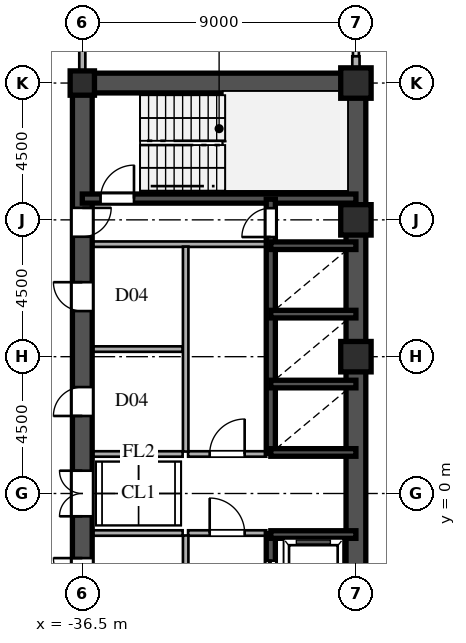
"""IFC4 building model, lengths in metres.
Left out: names, types, materials, properties, quantities, classifications, styles, units other than length and angle.
Written with IfcOpenShell. Run it as: python <this file> out.ifc"""

import sys

from ifc_helpers import new_model, si_unit, direction, frame, frame_2d, origin, origin_2d, place, context, subcontext, project, spatial, rectangle, hollow_rectangle, i_section, extrude, source, transform, mapped, element, fill, save


model = new_model("IFC4")
c1 = context("Model", 3, precision=1e-05, world=origin(), true_north=direction((0.0, 1.0)))
c2 = subcontext(c1, "Body", "Model", "MODEL_VIEW")
j1 = project(units=[si_unit("LENGTHUNIT", "METRE"), si_unit("PLANEANGLEUNIT", "RADIAN")], contexts=[c1])
p1 = place(None, origin())
s1 = spatial("IfcSite", under=j1, at=p1, CompositionType="ELEMENT")
p2 = place(p1, origin())
s2 = spatial("IfcBuilding", under=s1, at=p2, CompositionType="ELEMENT")
p3 = place(p2, frame((0.0, 0.0, 72.9)))
s3 = spatial("IfcBuildingStorey", under=s2, at=p3, CompositionType="ELEMENT", Elevation=72.9)
m1 = source(origin(), c2, "Body", "SweptSolid", [
    extrude(hollow_rectangle(XDim=1.0, YDim=1.0, WallThickness=0.042, at=origin_2d()), origin(), (0.0, 0.0, 1.0), 3.6),
])
for number, where, z_axis, x_axis in (
    (1, (-27.5, 4.5, 0.0), (0.0, 0.0, 1.0), (1.0, 0.0, 0.0)),
    (2, (-27.5, 9.0, 0.0), (0.0, 0.0, 1.0), (1.0, 0.0, 0.0)),
    (3, (-27.5, 13.5, 0.0), (0.0, 0.0, 1.0), (1.0, 0.0, 0.0)),
):
    element("IfcColumn", number, at=place(p3, frame(where, z_axis=z_axis, x_axis=x_axis)), inside=s3, PredefinedType="COLUMN", context=c2, shape_type="MappedRepresentation", body=[
        mapped(m1, transform((0.0, 0.0, 0.0), scale=1.0)),
    ])
m2 = source(origin(), c2, "Body", "SweptSolid", [
    extrude(i_section(OverallWidth=0.8, OverallDepth=0.8, WebThickness=0.032, FlangeThickness=0.05, at=origin_2d()), origin(), (0.0, 0.0, 1.0), 3.6),
])
p4 = place(p3, frame((-36.5, 13.5, 0.0), z_axis=(0.0, 0.0, 1.0), x_axis=(1.0, 0.0, 0.0)))
e4 = element("IfcColumn", 4, at=p4, inside=s3, PredefinedType="COLUMN", context=c2, shape_type="MappedRepresentation", body=[
    mapped(m2, transform((0.0, 0.0, 0.0), scale=1.0)),
])
p5 = place(p3, frame((-27.5, 13.83, 0.0), z_axis=(0.0, 0.0, 1.0), x_axis=(0.0, 1.0, 0.0)))
e5 = element("IfcWall", 5, at=p5, inside=s3, PredefinedType="SOLIDWALL", context=c2, shape_type="SweptSolid", body=[
    extrude(rectangle(XDim=0.55, YDim=0.24, at=frame_2d((0.275, 0.0))), origin(), (0.0, 0.0, 1.0), 2.88),
])
for number, where, z_axis, x_axis in (
    (6, (-27.5, -13.5, 0.0), (0.0, 0.0, 1.0), (0.0, 1.0, 0.0)),
    (7, (-27.5, 1.3, 0.0), (0.0, 0.0, 1.0), (0.0, 1.0, 0.0)),
):
    element("IfcWall", number, at=place(p3, frame(where, z_axis=z_axis, x_axis=x_axis)), inside=s3, PredefinedType="SHEAR", context=c2, shape_type="SweptSolid", body=[
        extrude(rectangle(XDim=12.2, YDim=0.65, at=frame_2d((6.1, 0.0))), origin(), (0.0, 0.0, 1.0), 3.38),
    ])
p6 = place(p3, frame((-27.5, -1.3, 0.0), z_axis=(0.0, 0.0, 1.0), x_axis=(0.0, 1.0, 0.0)))
e8 = element("IfcWall", 8, at=p6, inside=s3, PredefinedType="SHEAR", context=c2, shape_type="SweptSolid", body=[
    extrude(rectangle(XDim=2.6, YDim=0.65, at=frame_2d((1.3, 0.0))), origin(), (0.0, 0.0, 1.0), 3.38),
])
p7 = place(p3, frame((-36.5, 13.5, 0.0), z_axis=(0.0, 0.0, 1.0), x_axis=(1.0, 0.0, 0.0)))
e9 = element("IfcWall", 9, at=p7, inside=s3, PredefinedType="SHEAR", context=c2, shape_type="SweptSolid", body=[
    extrude(rectangle(XDim=9.0, YDim=0.65, at=frame_2d((4.5, 0.0))), origin(), (0.0, 0.0, 1.0), 3.38),
])
p8 = place(p3, frame((-36.5, -1.3, 0.0), z_axis=(0.0, 0.0, 1.0), x_axis=(0.0, 1.0, 0.0)))
e10 = element("IfcWall", 10, at=p8, inside=s3, PredefinedType="SHEAR", context=c2, shape_type="SweptSolid", body=[
    extrude(rectangle(XDim=2.6, YDim=0.65, at=frame_2d((1.3, 0.0))), origin(), (0.0, 0.0, 1.0), 3.38),
])
p9 = place(p8, frame((0.55, 0.0, 0.0)))
e11 = element("IfcOpeningElement", 11, at=p9, cuts=e10, PredefinedType="OPENING", context=c2, shape_type="SweptSolid", body=[
    extrude(rectangle(XDim=1.5, YDim=2.3, at=frame_2d((0.75, 1.15))), frame((0.0, 0.335, 0.0), z_axis=(0.0, -1.0, 0.0), x_axis=(1.0, 0.0, 0.0)), (0.0, 0.0, 1.0), 0.67),
])
p10 = place(p3, frame((-36.5, 8.2, 0.0), z_axis=(0.0, 0.0, 1.0), x_axis=(0.0, 1.0, 0.0)))
e12 = element("IfcWall", 12, at=p10, inside=s3, PredefinedType="SHEAR", context=c2, shape_type="SweptSolid", body=[
    extrude(rectangle(XDim=5.45, YDim=0.65, at=frame_2d((2.725, 0.0))), origin(), (0.0, 0.0, 1.0), 3.38),
])
p11 = place(p10, frame((0.245, 0.0, 0.0)))
e13 = element("IfcOpeningElement", 13, at=p11, cuts=e12, PredefinedType="OPENING", context=c2, shape_type="SweptSolid", body=[
    extrude(rectangle(XDim=0.95, YDim=2.15, at=frame_2d((0.475, 1.075))), frame((0.0, 0.335, 0.0), z_axis=(0.0, -1.0, 0.0), x_axis=(1.0, 0.0, 0.0)), (0.0, 0.0, 1.0), 0.67),
])
p12 = place(p3, frame((-36.5, -3.9, 0.0), z_axis=(0.0, 0.0, 1.0), x_axis=(0.0, 1.0, 0.0)))
e14 = element("IfcWall", 14, at=p12, inside=s3, PredefinedType="SHEAR", context=c2, shape_type="SweptSolid", body=[
    extrude(rectangle(XDim=2.6, YDim=0.65, at=frame_2d((1.3, 0.0))), origin(), (0.0, 0.0, 1.0), 3.38),
])
p13 = place(p12, frame((0.825, 0.0, 0.0)))
e15 = element("IfcOpeningElement", 15, at=p13, cuts=e14, PredefinedType="OPENING", context=c2, shape_type="SweptSolid", body=[
    extrude(rectangle(XDim=0.95, YDim=2.15, at=frame_2d((0.475, 1.075))), frame((0.0, 0.335, 0.0), z_axis=(0.0, -1.0, 0.0), x_axis=(1.0, 0.0, 0.0)), (0.0, 0.0, 1.0), 0.67),
])
p14 = place(p3, frame((-36.5, 1.3, 0.0), z_axis=(0.0, 0.0, 1.0), x_axis=(0.0, 1.0, 0.0)))
e16 = element("IfcWall", 16, at=p14, inside=s3, PredefinedType="SHEAR", context=c2, shape_type="SweptSolid", body=[
    extrude(rectangle(XDim=3.45, YDim=0.65, at=frame_2d((1.725, 0.0))), origin(), (0.0, 0.0, 1.0), 3.38),
])
p15 = place(p14, frame((1.25, 0.0, 0.0)))
e17 = element("IfcOpeningElement", 17, at=p15, cuts=e16, PredefinedType="OPENING", context=c2, shape_type="SweptSolid", body=[
    extrude(rectangle(XDim=0.95, YDim=2.15, at=frame_2d((0.475, 1.075))), frame((0.0, 0.335, 0.0), z_axis=(0.0, -1.0, 0.0), x_axis=(1.0, 0.0, 0.0)), (0.0, 0.0, 1.0), 0.67),
])
p16 = place(p3, frame((-36.5, 4.75, 0.0), z_axis=(0.0, 0.0, 1.0), x_axis=(0.0, 1.0, 0.0)))
e18 = element("IfcWall", 18, at=p16, inside=s3, PredefinedType="SHEAR", context=c2, shape_type="SweptSolid", body=[
    extrude(rectangle(XDim=3.45, YDim=0.65, at=frame_2d((1.725, 0.0))), origin(), (0.0, 0.0, 1.0), 3.38),
])
p17 = place(p16, frame((1.25, 0.0, 0.0)))
e19 = element("IfcOpeningElement", 19, at=p17, cuts=e18, PredefinedType="OPENING", context=c2, shape_type="SweptSolid", body=[
    extrude(rectangle(XDim=0.95, YDim=2.15, at=frame_2d((0.475, 1.075))), frame((0.0, 0.335, 0.0), z_axis=(0.0, -1.0, 0.0), x_axis=(1.0, 0.0, 0.0)), (0.0, 0.0, 1.0), 0.67),
])
p18 = place(p3, frame((-36.5, 9.7, 0.0), z_axis=(0.0, 0.0, 1.0), x_axis=(1.0, 0.0, 0.0)))
e20 = element("IfcWall", 20, at=p18, inside=s3, PredefinedType="SHEAR", context=c2, shape_type="SweptSolid", body=[
    extrude(rectangle(XDim=9.0, YDim=0.3, at=frame_2d((4.5, 0.0))), origin(), (0.0, 0.0, 1.0), 3.38),
])
p19 = place(p18, frame((0.6, 0.0, 0.0)))
e21 = element("IfcOpeningElement", 21, at=p19, cuts=e20, PredefinedType="OPENING", context=c2, shape_type="SweptSolid", body=[
    extrude(rectangle(XDim=1.1, YDim=2.2, at=frame_2d((0.55, 1.1))), frame((0.0, 0.16, 0.0), z_axis=(0.0, -1.0, 0.0), x_axis=(1.0, 0.0, 0.0)), (0.0, 0.0, 1.0), 0.32),
])
for number, where, z_axis, x_axis in (
    (22, (-30.3, -1.35, 0.0), (0.0, 0.0, 1.0), (1.0, 0.0, 0.0)),
    (23, (-30.3, 1.35, 0.0), (0.0, 0.0, 1.0), (1.0, 0.0, 0.0)),
    (24, (-30.3, 3.6, 0.0), (0.0, 0.0, 1.0), (1.0, 0.0, 0.0)),
    (25, (-30.3, 5.9, 0.0), (0.0, 0.0, 1.0), (1.0, 0.0, 0.0)),
    (26, (-30.3, 8.15, 0.0), (0.0, 0.0, 1.0), (1.0, 0.0, 0.0)),
):
    element("IfcWall", number, at=place(p3, frame(where, z_axis=z_axis, x_axis=x_axis)), inside=s3, PredefinedType="SHEAR", context=c2, shape_type="SweptSolid", body=[
        extrude(rectangle(XDim=2.8, YDim=0.25, at=frame_2d((1.4, 0.0))), origin(), (0.0, 0.0, 1.0), 3.38),
    ])
p20 = place(p3, frame((-30.3, -4.2, 0.0), z_axis=(0.0, 0.0, 1.0), x_axis=(0.0, 1.0, 0.0)))
e27 = element("IfcWall", 27, at=p20, inside=s3, PredefinedType="SHEAR", context=c2, shape_type="SweptSolid", body=[
    extrude(rectangle(XDim=2.88, YDim=0.3, at=frame_2d((1.44, 0.0))), origin(), (0.0, 0.0, 1.0), 3.38),
])
p21 = place(p20, frame((0.89, 0.0, 0.0)))
e28 = element("IfcOpeningElement", 28, at=p21, cuts=e27, PredefinedType="OPENING", context=c2, shape_type="SweptSolid", body=[
    extrude(rectangle(XDim=1.1, YDim=2.2, at=frame_2d((0.55, 1.1))), frame((0.0, 0.16, 0.0), z_axis=(0.0, -1.0, 0.0), x_axis=(1.0, 0.0, 0.0)), (0.0, 0.0, 1.0), 0.32),
])
p22 = place(p3, frame((-30.3, 1.32, 0.0), z_axis=(0.0, 0.0, 1.0), x_axis=(0.0, 1.0, 0.0)))
e29 = element("IfcWall", 29, at=p22, inside=s3, PredefinedType="SHEAR", context=c2, shape_type="SweptSolid", body=[
    extrude(rectangle(XDim=2.28, YDim=0.3, at=frame_2d((1.14, 0.0))), origin(), (0.0, 0.0, 1.0), 3.38),
])
p23 = place(p3, frame((-30.3, 3.6, 0.0), z_axis=(0.0, 0.0, 1.0), x_axis=(0.0, 1.0, 0.0)))
e30 = element("IfcWall", 30, at=p23, inside=s3, PredefinedType="SHEAR", context=c2, shape_type="SweptSolid", body=[
    extrude(rectangle(XDim=2.3, YDim=0.3, at=frame_2d((1.15, 0.0))), origin(), (0.0, 0.0, 1.0), 3.38),
])
p24 = place(p3, frame((-30.3, 5.9, 0.0), z_axis=(0.0, 0.0, 1.0), x_axis=(0.0, 1.0, 0.0)))
e31 = element("IfcWall", 31, at=p24, inside=s3, PredefinedType="SHEAR", context=c2, shape_type="SweptSolid", body=[
    extrude(rectangle(XDim=2.25, YDim=0.3, at=frame_2d((1.125, 0.0))), origin(), (0.0, 0.0, 1.0), 3.38),
])
p25 = place(p3, frame((-30.3, 8.15, 0.0), z_axis=(0.0, 0.0, 1.0), x_axis=(0.0, 1.0, 0.0)))
e32 = element("IfcWall", 32, at=p25, inside=s3, PredefinedType="SHEAR", context=c2, shape_type="SweptSolid", body=[
    extrude(rectangle(XDim=1.53, YDim=0.3, at=frame_2d((0.765, 0.0))), origin(), (0.0, 0.0, 1.0), 3.38),
])
p26 = place(p25, frame((0.285, 0.0, 0.0)))
e33 = element("IfcOpeningElement", 33, at=p26, cuts=e32, PredefinedType="OPENING", context=c2, shape_type="SweptSolid", body=[
    extrude(rectangle(XDim=0.95, YDim=2.15, at=frame_2d((0.475, 1.075))), frame((0.0, 0.16, 0.0), z_axis=(0.0, -1.0, 0.0), x_axis=(1.0, 0.0, 0.0)), (0.0, 0.0, 1.0), 0.32),
])
p27 = place(p3, frame((-36.15, 8.2, 0.0), z_axis=(0.0, 0.0, 1.0), x_axis=(1.0, 0.0, 0.0)))
e34 = element("IfcWall", 34, at=p27, inside=s3, PredefinedType="PARTITIONING", context=c2, shape_type="SweptSolid", body=[
    extrude(rectangle(XDim=5.7, YDim=0.18, at=frame_2d((2.85, 0.0))), origin(), (0.0, 0.0, 1.0), 3.38),
])
p28 = place(p3, frame((-33.1, -6.42, 0.0), z_axis=(0.0, 0.0, 1.0), x_axis=(0.0, 1.0, 0.0)))
e35 = element("IfcWall", 35, at=p28, inside=s3, PredefinedType="PARTITIONING", context=c2, shape_type="SweptSolid", body=[
    extrude(rectangle(XDim=5.04, YDim=0.18, at=frame_2d((2.52, 0.0))), origin(), (0.0, 0.0, 1.0), 3.38),
])
p29 = place(p3, frame((-33.1, 1.38, 0.0), z_axis=(0.0, 0.0, 1.0), x_axis=(0.0, 1.0, 0.0)))
e36 = element("IfcWall", 36, at=p29, inside=s3, PredefinedType="PARTITIONING", context=c2, shape_type="SweptSolid", body=[
    extrude(rectangle(XDim=6.74, YDim=0.18, at=frame_2d((3.37, 0.0))), origin(), (0.0, 0.0, 1.0), 3.38),
])
p30 = place(p3, frame((-33.02, -1.3, 0.0), z_axis=(0.0, 0.0, 1.0), x_axis=(1.0, 0.0, 0.0)))
e37 = element("IfcWall", 37, at=p30, inside=s3, PredefinedType="PARTITIONING", context=c2, shape_type="SweptSolid", body=[
    extrude(rectangle(XDim=2.57, YDim=0.18, at=frame_2d((1.285, 0.0))), origin(), (0.0, 0.0, 1.0), 3.38),
])
p31 = place(p30, frame((0.71, 0.0, 0.0)))
e38 = element("IfcOpeningElement", 38, at=p31, cuts=e37, PredefinedType="OPENING", context=c2, shape_type="SweptSolid", body=[
    extrude(rectangle(XDim=1.15, YDim=2.2, at=frame_2d((0.575, 1.1))), frame((0.0, 0.1, 0.0), z_axis=(0.0, -1.0, 0.0), x_axis=(1.0, 0.0, 0.0)), (0.0, 0.0, 1.0), 0.2),
])
p32 = place(p3, frame((-33.02, 1.3, 0.0), z_axis=(0.0, 0.0, 1.0), x_axis=(1.0, 0.0, 0.0)))
e39 = element("IfcWall", 39, at=p32, inside=s3, PredefinedType="PARTITIONING", context=c2, shape_type="SweptSolid", body=[
    extrude(rectangle(XDim=2.57, YDim=0.18, at=frame_2d((1.285, 0.0))), origin(), (0.0, 0.0, 1.0), 3.38),
])
p33 = place(p32, frame((0.71, 0.0, 0.0)))
e40 = element("IfcOpeningElement", 40, at=p33, cuts=e39, PredefinedType="OPENING", context=c2, shape_type="SweptSolid", body=[
    extrude(rectangle(XDim=1.15, YDim=2.2, at=frame_2d((0.575, 1.1))), frame((0.0, 0.1, 0.0), z_axis=(0.0, -1.0, 0.0), x_axis=(1.0, 0.0, 0.0)), (0.0, 0.0, 1.0), 0.2),
])
for number, where, z_axis, x_axis in (
    (41, (-36.15, -1.3, 0.0), (0.0, 0.0, 1.0), (1.0, 0.0, 0.0)),
    (42, (-36.15, 1.3, 0.0), (0.0, 0.0, 1.0), (1.0, 0.0, 0.0)),
    (43, (-36.15, 4.75, 0.0), (0.0, 0.0, 1.0), (1.0, 0.0, 0.0)),
):
    element("IfcWall", number, at=place(p3, frame(where, z_axis=z_axis, x_axis=x_axis)), inside=s3, PredefinedType="PARTITIONING", context=c2, shape_type="SweptSolid", body=[
        extrude(rectangle(XDim=2.95, YDim=0.18, at=frame_2d((1.475, 0.0))), origin(), (0.0, 0.0, 1.0), 3.38),
    ])
p34 = place(p3, frame((-36.5, 13.83, 0.0), z_axis=(0.0, 0.0, 1.0), x_axis=(0.0, 1.0, 0.0)))
e44 = element("IfcWall", 44, at=p34, inside=s3, PredefinedType="PARTITIONING", context=c2, shape_type="SweptSolid", body=[
    extrude(rectangle(XDim=1.685, YDim=0.2, at=frame_2d((0.842, 0.0))), origin(), (0.0, 0.0, 1.0), 2.68),
])
m3 = source(origin(), c2, "Body", "SweptSolid", [
    extrude(rectangle(XDim=1.5, YDim=2.3, at=frame_2d((0.75, 1.15))), frame((0.0, 0.025, 0.0), z_axis=(0.0, -1.0, 0.0), x_axis=(1.0, 0.0, 0.0)), (0.0, 0.0, 1.0), 0.05),
])
p35 = place(p9, origin())
e45 = element("IfcDoor", 45, at=p35, inside=s3, OperationType="DOUBLE_SWING_LEFT", PredefinedType="DOOR", context=c2, shape_type="MappedRepresentation", body=[
    mapped(m3, transform((0.0, 0.0, 0.0), scale=1.0)),
])
fill(e11, e45)
m4 = source(origin(), c2, "Body", "SweptSolid", [
    extrude(rectangle(XDim=0.95, YDim=2.15, at=frame_2d((0.475, 1.075))), frame((0.0, 0.025, 0.0), z_axis=(0.0, -1.0, 0.0), x_axis=(1.0, 0.0, 0.0)), (0.0, 0.0, 1.0), 0.05),
])
p36 = place(p11, frame((0.95, 0.0, 0.0), z_axis=(0.0, 0.0, 1.0), x_axis=(-1.0, 0.0, 0.0)))
e46 = element("IfcDoor", 46, at=p36, inside=s3, OperationType="SINGLE_SWING_RIGHT", PredefinedType="DOOR", context=c2, shape_type="MappedRepresentation", body=[
    mapped(m4, transform((0.0, 0.0, 0.0), scale=1.0)),
])
fill(e13, e46)
p37 = place(p13, origin())
e47 = element("IfcDoor", 47, at=p37, inside=s3, OperationType="SINGLE_SWING_RIGHT", PredefinedType="DOOR", context=c2, shape_type="MappedRepresentation", body=[
    mapped(m4, transform((0.0, 0.0, 0.0), scale=1.0)),
])
fill(e15, e47)
p38 = place(p15, origin())
e48 = element("IfcDoor", 48, at=p38, inside=s3, OperationType="SINGLE_SWING_LEFT", PredefinedType="DOOR", context=c2, shape_type="MappedRepresentation", body=[
    mapped(m4, transform((0.0, 0.0, 0.0), scale=1.0)),
])
fill(e17, e48)
p39 = place(p17, origin())
e49 = element("IfcDoor", 49, at=p39, inside=s3, OperationType="SINGLE_SWING_RIGHT", PredefinedType="DOOR", context=c2, shape_type="MappedRepresentation", body=[
    mapped(m4, transform((0.0, 0.0, 0.0), scale=1.0)),
])
fill(e19, e49)
m5 = source(origin(), c2, "Body", "SweptSolid", [
    extrude(rectangle(XDim=1.1, YDim=2.2, at=frame_2d((0.55, 1.1))), frame((0.0, 0.025, 0.0), z_axis=(0.0, -1.0, 0.0), x_axis=(1.0, 0.0, 0.0)), (0.0, 0.0, 1.0), 0.05),
])
p40 = place(p19, origin())
e50 = element("IfcDoor", 50, at=p40, inside=s3, OperationType="SINGLE_SWING_RIGHT", PredefinedType="DOOR", context=c2, shape_type="MappedRepresentation", body=[
    mapped(m5, transform((0.0, 0.0, 0.0), scale=1.0)),
])
fill(e21, e50)
m6 = source(origin(), c2, "Body", "SweptSolid", [
    extrude(rectangle(XDim=1.1, YDim=2.2, at=frame_2d((0.55, 1.1))), frame((0.0, 0.025, 0.0), z_axis=(0.0, -1.0, 0.0), x_axis=(1.0, 0.0, 0.0)), (0.0, 0.0, 1.0), 0.05),
])
p41 = place(p21, origin())
e51 = element("IfcDoor", 51, at=p41, inside=s3, OperationType="DOUBLE_DOOR_SLIDING", PredefinedType="DOOR", context=c2, shape_type="MappedRepresentation", body=[
    mapped(m6, transform((0.0, 0.0, 0.0), scale=1.0)),
])
fill(e28, e51)
p42 = place(p26, origin())
e52 = element("IfcDoor", 52, at=p42, inside=s3, OperationType="SINGLE_SWING_LEFT", PredefinedType="DOOR", context=c2, shape_type="MappedRepresentation", body=[
    mapped(m4, transform((0.0, 0.0, 0.0), scale=1.0)),
])
fill(e33, e52)
m7 = source(origin(), c2, "Body", "SweptSolid", [
    extrude(rectangle(XDim=1.15, YDim=2.2, at=frame_2d((0.575, 1.1))), frame((0.0, 0.025, 0.0), z_axis=(0.0, -1.0, 0.0), x_axis=(1.0, 0.0, 0.0)), (0.0, 0.0, 1.0), 0.05),
])
p43 = place(p31, origin())
e53 = element("IfcDoor", 53, at=p43, inside=s3, OperationType="SINGLE_SWING_LEFT", PredefinedType="DOOR", context=c2, shape_type="MappedRepresentation", body=[
    mapped(m7, transform((0.0, 0.0, 0.0), scale=1.0)),
])
fill(e38, e53)
p44 = place(p33, origin())
e54 = element("IfcDoor", 54, at=p44, inside=s3, OperationType="SINGLE_SWING_RIGHT", PredefinedType="DOOR", context=c2, shape_type="MappedRepresentation", body=[
    mapped(m7, transform((0.0, 0.0, 0.0), scale=1.0)),
])
fill(e40, e54)
save(model, sys.argv[1])
